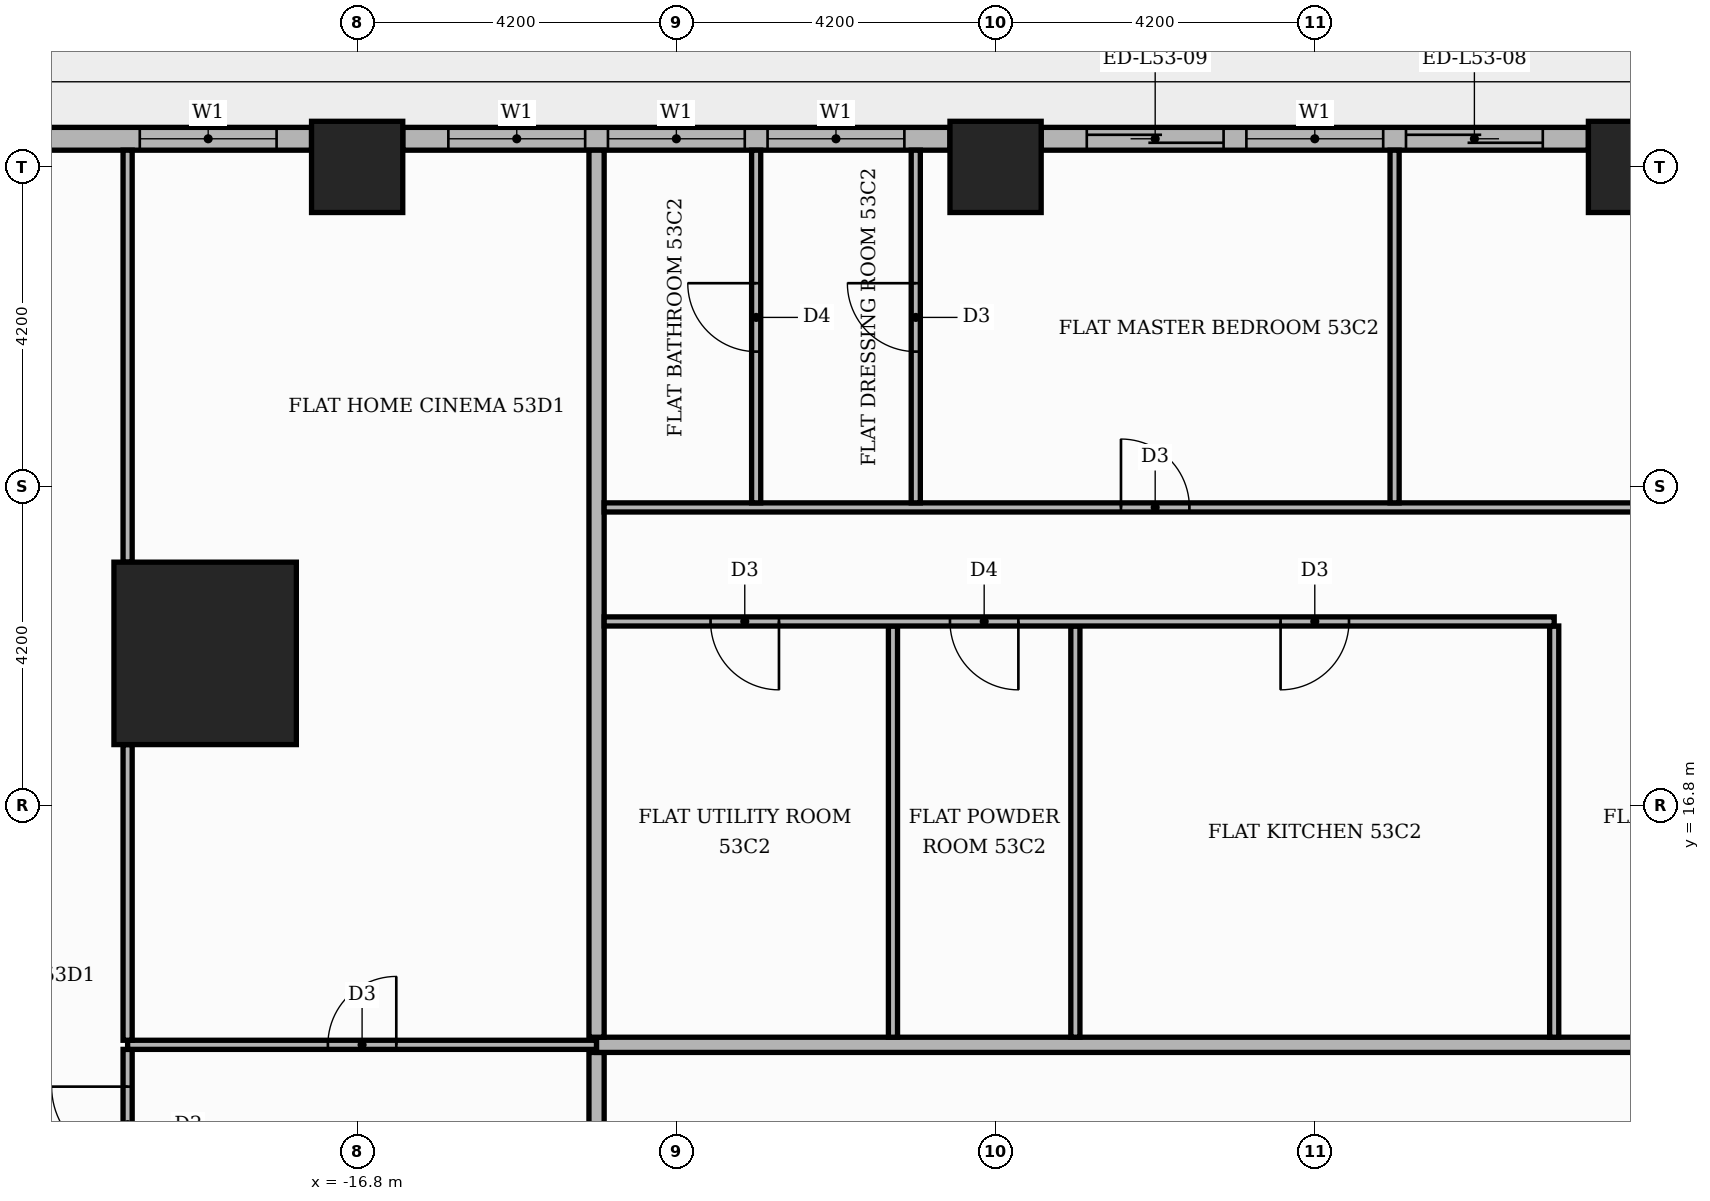
"""IFC4 building model, lengths in metres.
Left out: names, types, materials, properties, quantities, classifications, styles, units other than length and angle.
Written with IfcOpenShell. Run it as: python <this file> out.ifc"""

import sys

from ifc_helpers import new_model, si_unit, direction, frame, frame_2d, origin, origin_2d, place, context, subcontext, project, spatial, rectangle, extrude, element, fill, save


model = new_model("IFC4")
c1 = context("Model", 3, precision=1e-05, world=origin(), true_north=direction((0.0, 1.0)))
c2 = subcontext(c1, "Body", "Model", "MODEL_VIEW")
j1 = project(units=[si_unit("LENGTHUNIT", "METRE"), si_unit("PLANEANGLEUNIT", "RADIAN")], contexts=[c1])
p1 = place(None, origin())
s1 = spatial("IfcSite", under=j1, at=p1, CompositionType="ELEMENT")
p2 = place(p1, origin())
s2 = spatial("IfcBuilding", under=s1, at=p2, CompositionType="ELEMENT")
p3 = place(p2, frame((0.0, 0.0, 223.5)))
s3 = spatial("IfcBuildingStorey", under=s2, at=p3, CompositionType="ELEMENT", Elevation=223.5)
p4 = place(p3, frame((-18.8, 18.8, 0.0), z_axis=(0.0, 0.0, 1.0), x_axis=(1.0, 0.0, 0.0)))
e1 = element("IfcColumn", 1, at=p4, inside=s3, PredefinedType="COLUMN", context=c2, shape_type="SweptSolid", body=[
    extrude(rectangle(XDim=2.4, YDim=2.4, at=origin_2d()), origin(), (0.0, 0.0, 1.0), 3.9),
])
for number, where, z_axis, x_axis in (
    (2, (0.0, 25.2, 0.0), (0.0, 0.0, 1.0), (1.0, 0.0, 0.0)),
    (3, (-8.4, 25.2, 0.0), (0.0, 0.0, 1.0), (1.0, 0.0, 0.0)),
    (4, (-16.8, 25.2, 0.0), (0.0, 0.0, 1.0), (1.0, 0.0, 0.0)),
):
    element("IfcColumn", number, at=place(p3, frame(where, z_axis=z_axis, x_axis=x_axis)), inside=s3, PredefinedType="COLUMN", context=c2, shape_type="SweptSolid", body=[
        extrude(rectangle(XDim=1.2, YDim=1.2, at=origin_2d()), origin(), (0.0, 0.0, 1.0), 3.9),
    ])
p5 = place(p3, frame((-0.6, 25.57, 0.0), z_axis=(0.0, 0.0, 1.0), x_axis=(-1.0, 0.0, 0.0)))
e5 = element("IfcWall", 5, at=p5, inside=s3, PredefinedType="STANDARD", context=c2, shape_type="SweptSolid", body=[
    extrude(rectangle(XDim=7.2, YDim=0.3, at=frame_2d((3.6, 0.0))), origin(), (0.0, 0.0, 1.0), 3.48),
])
p6 = place(p5, frame((0.6, 0.0, 0.0)))
e6 = element("IfcOpeningElement", 6, at=p6, cuts=e5, PredefinedType="OPENING", context=c2, shape_type="SweptSolid", body=[
    extrude(rectangle(XDim=1.8, YDim=2.4, at=frame_2d((0.9, 1.2))), frame((0.0, 0.16, 0.0), z_axis=(0.0, -1.0, 0.0), x_axis=(1.0, 0.0, 0.0)), (0.0, 0.0, 1.0), 0.32),
])
p7 = place(p5, frame((2.7, 0.0, 0.9)))
e7 = element("IfcOpeningElement", 7, at=p7, cuts=e5, PredefinedType="OPENING", context=c2, shape_type="SweptSolid", body=[
    extrude(rectangle(XDim=1.8, YDim=2.1, at=frame_2d((0.9, 1.05))), frame((0.0, 0.16, 0.0), z_axis=(0.0, -1.0, 0.0), x_axis=(1.0, 0.0, 0.0)), (0.0, 0.0, 1.0), 0.32),
])
p8 = place(p5, frame((4.8, 0.0, 0.0)))
e8 = element("IfcOpeningElement", 8, at=p8, cuts=e5, PredefinedType="OPENING", context=c2, shape_type="SweptSolid", body=[
    extrude(rectangle(XDim=1.8, YDim=2.4, at=frame_2d((0.9, 1.2))), frame((0.0, 0.16, 0.0), z_axis=(0.0, -1.0, 0.0), x_axis=(1.0, 0.0, 0.0)), (0.0, 0.0, 1.0), 0.32),
])
p9 = place(p3, frame((-9.0, 25.57, 0.0), z_axis=(0.0, 0.0, 1.0), x_axis=(-1.0, 0.0, 0.0)))
e9 = element("IfcWall", 9, at=p9, inside=s3, PredefinedType="STANDARD", context=c2, shape_type="SweptSolid", body=[
    extrude(rectangle(XDim=7.2, YDim=0.3, at=frame_2d((3.6, 0.0))), origin(), (0.0, 0.0, 1.0), 3.48),
])
p10 = place(p9, frame((0.6, 0.0, 0.9)))
e10 = element("IfcOpeningElement", 10, at=p10, cuts=e9, PredefinedType="OPENING", context=c2, shape_type="SweptSolid", body=[
    extrude(rectangle(XDim=1.8, YDim=2.1, at=frame_2d((0.9, 1.05))), frame((0.0, 0.16, 0.0), z_axis=(0.0, -1.0, 0.0), x_axis=(1.0, 0.0, 0.0)), (0.0, 0.0, 1.0), 0.32),
])
p11 = place(p9, frame((2.7, 0.0, 0.9)))
e11 = element("IfcOpeningElement", 11, at=p11, cuts=e9, PredefinedType="OPENING", context=c2, shape_type="SweptSolid", body=[
    extrude(rectangle(XDim=1.8, YDim=2.1, at=frame_2d((0.9, 1.05))), frame((0.0, 0.16, 0.0), z_axis=(0.0, -1.0, 0.0), x_axis=(1.0, 0.0, 0.0)), (0.0, 0.0, 1.0), 0.32),
])
p12 = place(p9, frame((4.8, 0.0, 0.9)))
e12 = element("IfcOpeningElement", 12, at=p12, cuts=e9, PredefinedType="OPENING", context=c2, shape_type="SweptSolid", body=[
    extrude(rectangle(XDim=1.8, YDim=2.1, at=frame_2d((0.9, 1.05))), frame((0.0, 0.16, 0.0), z_axis=(0.0, -1.0, 0.0), x_axis=(1.0, 0.0, 0.0)), (0.0, 0.0, 1.0), 0.32),
])
p13 = place(p3, frame((-17.4, 25.57, 0.0), z_axis=(0.0, 0.0, 1.0), x_axis=(-1.0, 0.0, 0.0)))
e13 = element("IfcWall", 13, at=p13, inside=s3, PredefinedType="STANDARD", context=c2, shape_type="SweptSolid", body=[
    extrude(rectangle(XDim=3.82, YDim=0.3, at=frame_2d((1.91, 0.0))), origin(), (0.0, 0.0, 1.0), 3.48),
])
p14 = place(p13, frame((0.46, 0.0, 0.9)))
e14 = element("IfcOpeningElement", 14, at=p14, cuts=e13, PredefinedType="OPENING", context=c2, shape_type="SweptSolid", body=[
    extrude(rectangle(XDim=1.8, YDim=2.1, at=frame_2d((0.9, 1.05))), frame((0.0, 0.16, 0.0), z_axis=(0.0, -1.0, 0.0), x_axis=(1.0, 0.0, 0.0)), (0.0, 0.0, 1.0), 0.32),
])
p15 = place(p3, frame((-13.65, -13.55, 0.0), z_axis=(0.0, 0.0, 1.0), x_axis=(0.0, 1.0, 0.0)))
e15 = element("IfcWall", 15, at=p15, inside=s3, PredefinedType="PARTITIONING", context=c2, shape_type="SweptSolid", body=[
    extrude(rectangle(XDim=27.1, YDim=0.2, at=frame_2d((13.55, 0.0))), origin(), (0.0, 0.0, 1.0), 3.48),
])
p16 = place(p15, frame((23.5, 0.0, 0.0)))
e16 = element("IfcOpeningElement", 16, at=p16, cuts=e15, PredefinedType="OPENING", context=c2, shape_type="SweptSolid", body=[
    extrude(rectangle(XDim=1.1, YDim=2.4, at=frame_2d((0.55, 1.2))), frame((0.0, 0.11, 0.0), z_axis=(0.0, -1.0, 0.0), x_axis=(1.0, 0.0, 0.0)), (0.0, 0.0, 1.0), 0.22),
])
p17 = place(p3, frame((-19.82, 11.61, 0.0), z_axis=(0.0, 0.0, 1.0), x_axis=(0.0, 1.0, 0.0)))
e17 = element("IfcWall", 17, at=p17, inside=s3, PredefinedType="PARTITIONING", context=c2, shape_type="SweptSolid", body=[
    extrude(rectangle(XDim=1.98, YDim=0.12, at=frame_2d((0.99, 0.0))), origin(), (0.0, 0.0, 1.0), 3.48),
])
p18 = place(p17, frame((0.49, 0.0, 0.0)))
e18 = element("IfcOpeningElement", 18, at=p18, cuts=e17, PredefinedType="OPENING", context=c2, shape_type="SweptSolid", body=[
    extrude(rectangle(XDim=1.0, YDim=2.1, at=frame_2d((0.5, 1.05))), frame((0.0, 0.07, 0.0), z_axis=(0.0, -1.0, 0.0), x_axis=(1.0, 0.0, 0.0)), (0.0, 0.0, 1.0), 0.14),
])
p19 = place(p3, frame((-19.82, 13.65, 0.0), z_axis=(0.0, 0.0, 1.0), x_axis=(1.0, 0.0, 0.0)))
e19 = element("IfcWall", 19, at=p19, inside=s3, PredefinedType="PARTITIONING", context=c2, shape_type="SweptSolid", body=[
    extrude(rectangle(XDim=6.17, YDim=0.12, at=frame_2d((3.085, 0.0))), origin(), (0.0, 0.0, 1.0), 3.48),
])
p20 = place(p19, frame((2.635, 0.0, 0.0)))
e20 = element("IfcOpeningElement", 20, at=p20, cuts=e19, PredefinedType="OPENING", context=c2, shape_type="SweptSolid", body=[
    extrude(rectangle(XDim=0.9, YDim=2.1, at=frame_2d((0.45, 1.05))), frame((0.0, 0.07, 0.0), z_axis=(0.0, -1.0, 0.0), x_axis=(1.0, 0.0, 0.0)), (0.0, 0.0, 1.0), 0.14),
])
p21 = place(p3, frame((-13.65, 13.65, 0.0), z_axis=(0.0, 0.0, 1.0), x_axis=(1.0, 0.0, 0.0)))
e21 = element("IfcWall", 21, at=p21, inside=s3, PredefinedType="PARTITIONING", context=c2, shape_type="SweptSolid", body=[
    extrude(rectangle(XDim=39.07, YDim=0.2, at=frame_2d((19.535, 0.0))), origin(), (0.0, 0.0, 1.0), 3.48),
])
p22 = place(p21, frame((24.65, 0.0, 0.0)))
e22 = element("IfcOpeningElement", 22, at=p22, cuts=e21, PredefinedType="OPENING", context=c2, shape_type="SweptSolid", body=[
    extrude(rectangle(XDim=1.1, YDim=2.4, at=frame_2d((0.55, 1.2))), frame((0.0, 0.11, 0.0), z_axis=(0.0, -1.0, 0.0), x_axis=(1.0, 0.0, 0.0)), (0.0, 0.0, 1.0), 0.22),
])
p23 = place(p21, frame((14.15, 0.0, 0.0)))
e23 = element("IfcOpeningElement", 23, at=p23, cuts=e21, PredefinedType="OPENING", context=c2, shape_type="SweptSolid", body=[
    extrude(rectangle(XDim=1.1, YDim=2.4, at=frame_2d((0.55, 1.2))), frame((0.0, 0.11, 0.0), z_axis=(0.0, -1.0, 0.0), x_axis=(1.0, 0.0, 0.0)), (0.0, 0.0, 1.0), 0.22),
])
p24 = place(p3, frame((-19.82, 13.71, 0.0), z_axis=(0.0, 0.0, 1.0), x_axis=(0.0, 1.0, 0.0)))
e24 = element("IfcWall", 24, at=p24, inside=s3, PredefinedType="PARTITIONING", context=c2, shape_type="SweptSolid", body=[
    extrude(rectangle(XDim=3.89, YDim=0.12, at=frame_2d((1.945, 0.0))), origin(), (0.0, 0.0, 1.0), 3.48),
])
p25 = place(p3, frame((-13.65, 13.75, 0.0), z_axis=(0.0, 0.0, 1.0), x_axis=(0.0, 1.0, 0.0)))
e25 = element("IfcWall", 25, at=p25, inside=s3, PredefinedType="PARTITIONING", context=c2, shape_type="SweptSolid", body=[
    extrude(rectangle(XDim=11.67, YDim=0.2, at=frame_2d((5.835, 0.0))), origin(), (0.0, 0.0, 1.0), 3.48),
])
for number, where, z_axis, x_axis in (
    (26, (-9.75, 13.75, 0.0), (0.0, 0.0, 1.0), (0.0, 1.0, 0.0)),
    (27, (-7.35, 13.75, 0.0), (0.0, 0.0, 1.0), (0.0, 1.0, 0.0)),
    (28, (-1.05, 13.75, 0.0), (0.0, 0.0, 1.0), (0.0, 1.0, 0.0)),
):
    element("IfcWall", number, at=place(p3, frame(where, z_axis=z_axis, x_axis=x_axis)), inside=s3, PredefinedType="PARTITIONING", context=c2, shape_type="SweptSolid", body=[
        extrude(rectangle(XDim=5.41, YDim=0.12, at=frame_2d((2.705, 0.0))), origin(), (0.0, 0.0, 1.0), 3.48),
    ])
p26 = place(p3, frame((-13.55, 19.22, 0.0), z_axis=(0.0, 0.0, 1.0), x_axis=(1.0, 0.0, 0.0)))
e29 = element("IfcWall", 29, at=p26, inside=s3, PredefinedType="PARTITIONING", context=c2, shape_type="SweptSolid", body=[
    extrude(rectangle(XDim=12.5, YDim=0.12, at=frame_2d((6.25, 0.0))), origin(), (0.0, 0.0, 1.0), 3.48),
])
p27 = place(p26, frame((8.9, 0.0, 0.0)))
e30 = element("IfcOpeningElement", 30, at=p27, cuts=e29, PredefinedType="OPENING", context=c2, shape_type="SweptSolid", body=[
    extrude(rectangle(XDim=0.9, YDim=2.1, at=frame_2d((0.45, 1.05))), frame((0.0, 0.07, 0.0), z_axis=(0.0, -1.0, 0.0), x_axis=(1.0, 0.0, 0.0)), (0.0, 0.0, 1.0), 0.14),
])
p28 = place(p26, frame((4.55, 0.0, 0.0)))
e31 = element("IfcOpeningElement", 31, at=p28, cuts=e29, PredefinedType="OPENING", context=c2, shape_type="SweptSolid", body=[
    extrude(rectangle(XDim=0.9, YDim=2.1, at=frame_2d((0.45, 1.05))), frame((0.0, 0.07, 0.0), z_axis=(0.0, -1.0, 0.0), x_axis=(1.0, 0.0, 0.0)), (0.0, 0.0, 1.0), 0.14),
])
p29 = place(p26, frame((1.4, 0.0, 0.0)))
e32 = element("IfcOpeningElement", 32, at=p29, cuts=e29, PredefinedType="OPENING", context=c2, shape_type="SweptSolid", body=[
    extrude(rectangle(XDim=0.9, YDim=2.1, at=frame_2d((0.45, 1.05))), frame((0.0, 0.07, 0.0), z_axis=(0.0, -1.0, 0.0), x_axis=(1.0, 0.0, 0.0)), (0.0, 0.0, 1.0), 0.14),
])
p30 = place(p3, frame((-19.82, 20.0, 0.0), z_axis=(0.0, 0.0, 1.0), x_axis=(0.0, 1.0, 0.0)))
e33 = element("IfcWall", 33, at=p30, inside=s3, PredefinedType="PARTITIONING", context=c2, shape_type="SweptSolid", body=[
    extrude(rectangle(XDim=5.42, YDim=0.12, at=frame_2d((2.71, 0.0))), origin(), (0.0, 0.0, 1.0), 3.48),
])
p31 = place(p3, frame((-13.55, 20.72, 0.0), z_axis=(0.0, 0.0, 1.0), x_axis=(1.0, 0.0, 0.0)))
e34 = element("IfcWall", 34, at=p31, inside=s3, PredefinedType="PARTITIONING", context=c2, shape_type="SweptSolid", body=[
    extrude(rectangle(XDim=18.7, YDim=0.12, at=frame_2d((9.35, 0.0))), origin(), (0.0, 0.0, 1.0), 3.48),
])
p32 = place(p31, frame((14.1, 0.0, 0.0)))
e35 = element("IfcOpeningElement", 35, at=p32, cuts=e34, PredefinedType="OPENING", context=c2, shape_type="SweptSolid", body=[
    extrude(rectangle(XDim=1.0, YDim=2.1, at=frame_2d((0.5, 1.05))), frame((0.0, 0.07, 0.0), z_axis=(0.0, -1.0, 0.0), x_axis=(1.0, 0.0, 0.0)), (0.0, 0.0, 1.0), 0.14),
])
p33 = place(p31, frame((6.8, 0.0, 0.0)))
e36 = element("IfcOpeningElement", 36, at=p33, cuts=e34, PredefinedType="OPENING", context=c2, shape_type="SweptSolid", body=[
    extrude(rectangle(XDim=0.9, YDim=2.1, at=frame_2d((0.45, 1.05))), frame((0.0, 0.07, 0.0), z_axis=(0.0, -1.0, 0.0), x_axis=(1.0, 0.0, 0.0)), (0.0, 0.0, 1.0), 0.14),
])
p34 = place(p3, frame((-11.55, 20.78, 0.0), z_axis=(0.0, 0.0, 1.0), x_axis=(0.0, 1.0, 0.0)))
e37 = element("IfcWall", 37, at=p34, inside=s3, PredefinedType="PARTITIONING", context=c2, shape_type="SweptSolid", body=[
    extrude(rectangle(XDim=4.64, YDim=0.12, at=frame_2d((2.32, 0.0))), origin(), (0.0, 0.0, 1.0), 3.48),
])
p35 = place(p34, frame((1.99, 0.0, 0.0)))
e38 = element("IfcOpeningElement", 38, at=p35, cuts=e37, PredefinedType="OPENING", context=c2, shape_type="SweptSolid", body=[
    extrude(rectangle(XDim=0.9, YDim=2.1, at=frame_2d((0.45, 1.05))), frame((0.0, 0.07, 0.0), z_axis=(0.0, -1.0, 0.0), x_axis=(1.0, 0.0, 0.0)), (0.0, 0.0, 1.0), 0.14),
])
p36 = place(p3, frame((-9.45, 20.78, 0.0), z_axis=(0.0, 0.0, 1.0), x_axis=(0.0, 1.0, 0.0)))
e39 = element("IfcWall", 39, at=p36, inside=s3, PredefinedType="PARTITIONING", context=c2, shape_type="SweptSolid", body=[
    extrude(rectangle(XDim=4.64, YDim=0.12, at=frame_2d((2.32, 0.0))), origin(), (0.0, 0.0, 1.0), 3.48),
])
p37 = place(p36, frame((1.99, 0.0, 0.0)))
e40 = element("IfcOpeningElement", 40, at=p37, cuts=e39, PredefinedType="OPENING", context=c2, shape_type="SweptSolid", body=[
    extrude(rectangle(XDim=0.9, YDim=2.1, at=frame_2d((0.45, 1.05))), frame((0.0, 0.07, 0.0), z_axis=(0.0, -1.0, 0.0), x_axis=(1.0, 0.0, 0.0)), (0.0, 0.0, 1.0), 0.14),
])
p38 = place(p3, frame((-3.15, 20.78, 0.0), z_axis=(0.0, 0.0, 1.0), x_axis=(0.0, 1.0, 0.0)))
e41 = element("IfcWall", 41, at=p38, inside=s3, PredefinedType="PARTITIONING", context=c2, shape_type="SweptSolid", body=[
    extrude(rectangle(XDim=4.64, YDim=0.12, at=frame_2d((2.32, 0.0))), origin(), (0.0, 0.0, 1.0), 3.48),
])
p39 = place(p6, origin())
e42 = element("IfcDoor", 42, at=p39, inside=s3, OperationType="SLIDING_TO_LEFT", PredefinedType="DOOR", context=c2, shape_type="SweptSolid", body=[
    extrude(rectangle(XDim=1.8, YDim=2.4, at=frame_2d((0.9, 1.2))), frame((0.0, 0.025, 0.0), z_axis=(0.0, -1.0, 0.0), x_axis=(1.0, 0.0, 0.0)), (0.0, 0.0, 1.0), 0.05),
])
fill(e6, e42)
p40 = place(p7, origin())
e43 = element("IfcWindow", 43, at=p40, inside=s3, PartitioningType="SINGLE_PANEL", PredefinedType="WINDOW", context=c2, shape_type="SweptSolid", body=[
    extrude(rectangle(XDim=1.8, YDim=2.1, at=frame_2d((0.9, 1.05))), frame((0.0, 0.03, 0.0), z_axis=(0.0, -1.0, 0.0), x_axis=(1.0, 0.0, 0.0)), (0.0, 0.0, 1.0), 0.06),
])
fill(e7, e43)
p41 = place(p8, origin())
e44 = element("IfcDoor", 44, at=p41, inside=s3, OperationType="SLIDING_TO_RIGHT", PredefinedType="DOOR", context=c2, shape_type="SweptSolid", body=[
    extrude(rectangle(XDim=1.8, YDim=2.4, at=frame_2d((0.9, 1.2))), frame((0.0, 0.025, 0.0), z_axis=(0.0, -1.0, 0.0), x_axis=(1.0, 0.0, 0.0)), (0.0, 0.0, 1.0), 0.05),
])
fill(e8, e44)
p42 = place(p10, origin())
e45 = element("IfcWindow", 45, at=p42, inside=s3, PartitioningType="SINGLE_PANEL", PredefinedType="WINDOW", context=c2, shape_type="SweptSolid", body=[
    extrude(rectangle(XDim=1.8, YDim=2.1, at=frame_2d((0.9, 1.05))), frame((0.0, 0.03, 0.0), z_axis=(0.0, -1.0, 0.0), x_axis=(1.0, 0.0, 0.0)), (0.0, 0.0, 1.0), 0.06),
])
fill(e10, e45)
p43 = place(p11, origin())
e46 = element("IfcWindow", 46, at=p43, inside=s3, PartitioningType="SINGLE_PANEL", PredefinedType="WINDOW", context=c2, shape_type="SweptSolid", body=[
    extrude(rectangle(XDim=1.8, YDim=2.1, at=frame_2d((0.9, 1.05))), frame((0.0, 0.03, 0.0), z_axis=(0.0, -1.0, 0.0), x_axis=(1.0, 0.0, 0.0)), (0.0, 0.0, 1.0), 0.06),
])
fill(e11, e46)
p44 = place(p12, origin())
e47 = element("IfcWindow", 47, at=p44, inside=s3, PartitioningType="SINGLE_PANEL", PredefinedType="WINDOW", context=c2, shape_type="SweptSolid", body=[
    extrude(rectangle(XDim=1.8, YDim=2.1, at=frame_2d((0.9, 1.05))), frame((0.0, 0.03, 0.0), z_axis=(0.0, -1.0, 0.0), x_axis=(1.0, 0.0, 0.0)), (0.0, 0.0, 1.0), 0.06),
])
fill(e12, e47)
p45 = place(p14, origin())
e48 = element("IfcWindow", 48, at=p45, inside=s3, PartitioningType="SINGLE_PANEL", PredefinedType="WINDOW", context=c2, shape_type="SweptSolid", body=[
    extrude(rectangle(XDim=1.8, YDim=2.1, at=frame_2d((0.9, 1.05))), frame((0.0, 0.03, 0.0), z_axis=(0.0, -1.0, 0.0), x_axis=(1.0, 0.0, 0.0)), (0.0, 0.0, 1.0), 0.06),
])
fill(e14, e48)
p46 = place(p27, frame((0.9, 0.0, 0.0), z_axis=(0.0, 0.0, 1.0), x_axis=(-1.0, 0.0, 0.0)))
e49 = element("IfcDoor", 49, at=p46, inside=s3, OperationType="SINGLE_SWING_LEFT", PredefinedType="DOOR", context=c2, shape_type="SweptSolid", body=[
    extrude(rectangle(XDim=0.9, YDim=2.1, at=frame_2d((0.45, 1.05))), frame((0.0, 0.025, 0.0), z_axis=(0.0, -1.0, 0.0), x_axis=(1.0, 0.0, 0.0)), (0.0, 0.0, 1.0), 0.05),
])
fill(e30, e49)
p47 = place(p28, frame((0.9, 0.0, 0.0), z_axis=(0.0, 0.0, 1.0), x_axis=(-1.0, 0.0, 0.0)))
e50 = element("IfcDoor", 50, at=p47, inside=s3, OperationType="SINGLE_SWING_RIGHT", PredefinedType="DOOR", context=c2, shape_type="SweptSolid", body=[
    extrude(rectangle(XDim=0.9, YDim=2.1, at=frame_2d((0.45, 1.05))), frame((0.0, 0.025, 0.0), z_axis=(0.0, -1.0, 0.0), x_axis=(1.0, 0.0, 0.0)), (0.0, 0.0, 1.0), 0.05),
])
fill(e31, e50)
p48 = place(p29, frame((0.9, 0.0, 0.0), z_axis=(0.0, 0.0, 1.0), x_axis=(-1.0, 0.0, 0.0)))
e51 = element("IfcDoor", 51, at=p48, inside=s3, OperationType="SINGLE_SWING_RIGHT", PredefinedType="DOOR", context=c2, shape_type="SweptSolid", body=[
    extrude(rectangle(XDim=0.9, YDim=2.1, at=frame_2d((0.45, 1.05))), frame((0.0, 0.025, 0.0), z_axis=(0.0, -1.0, 0.0), x_axis=(1.0, 0.0, 0.0)), (0.0, 0.0, 1.0), 0.05),
])
fill(e32, e51)
p49 = place(p33, origin())
e52 = element("IfcDoor", 52, at=p49, inside=s3, OperationType="SINGLE_SWING_LEFT", PredefinedType="DOOR", context=c2, shape_type="SweptSolid", body=[
    extrude(rectangle(XDim=0.9, YDim=2.1, at=frame_2d((0.45, 1.05))), frame((0.0, 0.025, 0.0), z_axis=(0.0, -1.0, 0.0), x_axis=(1.0, 0.0, 0.0)), (0.0, 0.0, 1.0), 0.05),
])
fill(e36, e52)
p50 = place(p37, origin())
e53 = element("IfcDoor", 53, at=p50, inside=s3, OperationType="SINGLE_SWING_RIGHT", PredefinedType="DOOR", context=c2, shape_type="SweptSolid", body=[
    extrude(rectangle(XDim=0.9, YDim=2.1, at=frame_2d((0.45, 1.05))), frame((0.0, 0.025, 0.0), z_axis=(0.0, -1.0, 0.0), x_axis=(1.0, 0.0, 0.0)), (0.0, 0.0, 1.0), 0.05),
])
fill(e40, e53)
p51 = place(p35, origin())
e54 = element("IfcDoor", 54, at=p51, inside=s3, OperationType="SINGLE_SWING_RIGHT", PredefinedType="DOOR", context=c2, shape_type="SweptSolid", body=[
    extrude(rectangle(XDim=0.9, YDim=2.1, at=frame_2d((0.45, 1.05))), frame((0.0, 0.025, 0.0), z_axis=(0.0, -1.0, 0.0), x_axis=(1.0, 0.0, 0.0)), (0.0, 0.0, 1.0), 0.05),
])
fill(e38, e54)
p52 = place(p20, origin())
e55 = element("IfcDoor", 55, at=p52, inside=s3, OperationType="SINGLE_SWING_RIGHT", PredefinedType="DOOR", context=c2, shape_type="SweptSolid", body=[
    extrude(rectangle(XDim=0.9, YDim=2.1, at=frame_2d((0.45, 1.05))), frame((0.0, 0.025, 0.0), z_axis=(0.0, -1.0, 0.0), x_axis=(1.0, 0.0, 0.0)), (0.0, 0.0, 1.0), 0.05),
])
fill(e20, e55)
p53 = place(p18, origin())
e56 = element("IfcDoor", 56, at=p53, inside=s3, OperationType="SINGLE_SWING_RIGHT", PredefinedType="DOOR", context=c2, shape_type="SweptSolid", body=[
    extrude(rectangle(XDim=1.0, YDim=2.1, at=frame_2d((0.5, 1.05))), frame((0.0, 0.025, 0.0), z_axis=(0.0, -1.0, 0.0), x_axis=(1.0, 0.0, 0.0)), (0.0, 0.0, 1.0), 0.05),
])
fill(e18, e56)
save(model, sys.argv[1])
